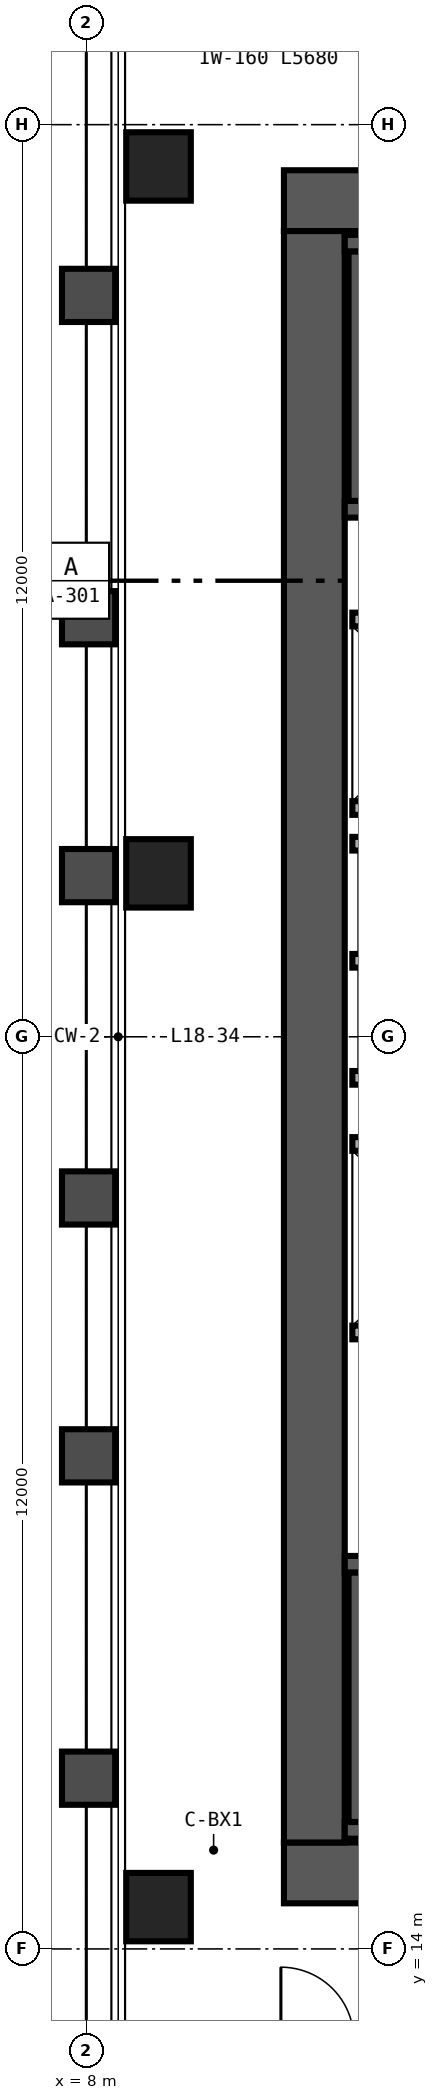
"""IFC4 building model, lengths in metres.
Left out: names, types, materials, properties, quantities, classifications, styles, units other than length and angle.
Written with IfcOpenShell. Run it as: python <this file> out.ifc"""

import sys

from ifc_helpers import new_model, si_unit, direction, frame, frame_2d, origin, origin_2d, place, context, subcontext, project, spatial, rectangle, hollow_rectangle, extrude, source, transform, mapped, element, save


model = new_model("IFC4")
c1 = context("Model", 3, precision=1e-05, world=origin(), true_north=direction((0.0, 1.0)))
c2 = subcontext(c1, "Body", "Model", "MODEL_VIEW")
j1 = project(units=[si_unit("LENGTHUNIT", "METRE"), si_unit("PLANEANGLEUNIT", "RADIAN")], contexts=[c1])
p1 = place(None, origin())
s1 = spatial("IfcSite", under=j1, at=p1, CompositionType="ELEMENT")
p2 = place(p1, origin())
s2 = spatial("IfcBuilding", under=s1, at=p2, CompositionType="ELEMENT")
p3 = place(p2, frame((0.0, 0.0, 74.4)))
s3 = spatial("IfcBuildingStorey", under=s2, at=p3, CompositionType="ELEMENT", Elevation=74.4)
p4 = place(p3, frame((10.6, 15.0, 0.0), z_axis=(0.0, 0.0, 1.0), x_axis=(1.0, 0.0, 0.0)))
e1 = element("IfcWall", 1, at=p4, inside=s3, PredefinedType="SHEAR", context=c2, shape_type="SweptSolid", body=[
    extrude(rectangle(XDim=12.8, YDim=0.8, at=frame_2d((6.4, 0.0))), origin(), (0.0, 0.0, 1.0), 3.35),
])
p5 = place(p4, frame((10.3, 0.0, 0.0)))
e2 = element("IfcOpeningElement", 2, at=p5, cuts=e1, PredefinedType="OPENING", context=c2, shape_type="SweptSolid", body=[
    extrude(rectangle(XDim=1.0, YDim=2.15, at=frame_2d((0.5, 1.075))), frame((0.0, 0.41, 0.0), z_axis=(0.0, -1.0, 0.0), x_axis=(1.0, 0.0, 0.0)), (0.0, 0.0, 1.0), 0.82),
])
p6 = place(p3, frame((10.6, 37.0, 0.0), z_axis=(0.0, 0.0, 1.0), x_axis=(1.0, 0.0, 0.0)))
e3 = element("IfcWall", 3, at=p6, inside=s3, PredefinedType="SHEAR", context=c2, shape_type="SweptSolid", body=[
    extrude(rectangle(XDim=12.8, YDim=0.8, at=frame_2d((6.4, 0.0))), origin(), (0.0, 0.0, 1.0), 3.35),
])
p7 = place(p6, frame((10.5, 0.0, 0.0)))
e4 = element("IfcOpeningElement", 4, at=p7, cuts=e3, PredefinedType="OPENING", context=c2, shape_type="SweptSolid", body=[
    extrude(rectangle(XDim=1.0, YDim=2.15, at=frame_2d((0.5, 1.075))), frame((0.0, 0.41, 0.0), z_axis=(0.0, -1.0, 0.0), x_axis=(1.0, 0.0, 0.0)), (0.0, 0.0, 1.0), 0.82),
])
p8 = place(p3, frame((11.0, 15.4, 0.0), z_axis=(0.0, 0.0, 1.0), x_axis=(0.0, 1.0, 0.0)))
e5 = element("IfcWall", 5, at=p8, inside=s3, PredefinedType="SHEAR", context=c2, shape_type="SweptSolid", body=[
    extrude(rectangle(XDim=21.2, YDim=0.8, at=frame_2d((10.6, 0.0))), origin(), (0.0, 0.0, 1.0), 3.35),
])
p9 = place(p3, frame((11.4, 15.56, 0.0), z_axis=(0.0, 0.0, 1.0), x_axis=(1.0, 0.0, 0.0)))
e6 = element("IfcWall", 6, at=p9, inside=s3, PredefinedType="SHEAR", context=c2, shape_type="SweptSolid", body=[
    extrude(rectangle(XDim=7.91, YDim=0.22, at=frame_2d((3.955, 0.0))), origin(), (0.0, 0.0, 1.0), 3.4),
])
p10 = place(p3, frame((11.4, 19.06, 0.0), z_axis=(0.0, 0.0, 1.0), x_axis=(1.0, 0.0, 0.0)))
e7 = element("IfcWall", 7, at=p10, inside=s3, PredefinedType="SHEAR", context=c2, shape_type="SweptSolid", body=[
    extrude(rectangle(XDim=7.91, YDim=0.22, at=frame_2d((3.955, 0.0))), origin(), (0.0, 0.0, 1.0), 3.4),
])
p11 = place(p10, frame((0.52, 0.0, 0.0)))
e8 = element("IfcOpeningElement", 8, at=p11, cuts=e7, PredefinedType="OPENING", context=c2, shape_type="SweptSolid", body=[
    extrude(rectangle(XDim=1.05, YDim=2.15, at=frame_2d((0.525, 1.075))), frame((0.0, 0.12, 0.0), z_axis=(0.0, -1.0, 0.0), x_axis=(1.0, 0.0, 0.0)), (0.0, 0.0, 1.0), 0.24),
])
p12 = place(p3, frame((11.56, 15.67, 0.0), z_axis=(0.0, 0.0, 1.0), x_axis=(0.0, 1.0, 0.0)))
e9 = element("IfcWall", 9, at=p12, inside=s3, PredefinedType="SHEAR", context=c2, shape_type="SweptSolid", body=[
    extrude(rectangle(XDim=3.28, YDim=0.22, at=frame_2d((1.64, 0.0))), origin(), (0.0, 0.0, 1.0), 3.4),
])
p13 = place(p3, frame((11.4, 32.94, 0.0), z_axis=(0.0, 0.0, 1.0), x_axis=(1.0, 0.0, 0.0)))
e10 = element("IfcWall", 10, at=p13, inside=s3, PredefinedType="SHEAR", context=c2, shape_type="SweptSolid", body=[
    extrude(rectangle(XDim=7.91, YDim=0.22, at=frame_2d((3.955, 0.0))), origin(), (0.0, 0.0, 1.0), 3.4),
])
p14 = place(p13, frame((0.52, 0.0, 0.0)))
e11 = element("IfcOpeningElement", 11, at=p14, cuts=e10, PredefinedType="OPENING", context=c2, shape_type="SweptSolid", body=[
    extrude(rectangle(XDim=1.05, YDim=2.15, at=frame_2d((0.525, 1.075))), frame((0.0, 0.12, 0.0), z_axis=(0.0, -1.0, 0.0), x_axis=(1.0, 0.0, 0.0)), (0.0, 0.0, 1.0), 0.24),
])
p15 = place(p3, frame((11.4, 36.44, 0.0), z_axis=(0.0, 0.0, 1.0), x_axis=(1.0, 0.0, 0.0)))
e12 = element("IfcWall", 12, at=p15, inside=s3, PredefinedType="SHEAR", context=c2, shape_type="SweptSolid", body=[
    extrude(rectangle(XDim=7.91, YDim=0.22, at=frame_2d((3.955, 0.0))), origin(), (0.0, 0.0, 1.0), 3.4),
])
p16 = place(p3, frame((11.56, 33.05, 0.0), z_axis=(0.0, 0.0, 1.0), x_axis=(0.0, 1.0, 0.0)))
e13 = element("IfcWall", 13, at=p16, inside=s3, PredefinedType="SHEAR", context=c2, shape_type="SweptSolid", body=[
    extrude(rectangle(XDim=3.28, YDim=0.22, at=frame_2d((1.64, 0.0))), origin(), (0.0, 0.0, 1.0), 3.4),
])
m1 = source(origin(), c2, "Body", "SweptSolid", [
    extrude(hollow_rectangle(XDim=0.85, YDim=0.9, WallThickness=0.04, at=origin_2d()), origin(), (0.0, 0.0, 1.0), 3.35),
])
for number, where, z_axis, x_axis in (
    (14, (8.95, 14.55, 0.0), (0.0, 0.0, 1.0), (1.0, 0.0, 0.0)),
    (15, (8.95, 28.15, 0.0), (0.0, 0.0, 1.0), (1.0, 0.0, 0.0)),
    (16, (8.95, 37.45, 0.0), (0.0, 0.0, 1.0), (1.0, 0.0, 0.0)),
):
    element("IfcColumn", number, at=place(p3, frame(where, z_axis=z_axis, x_axis=x_axis)), inside=s3, PredefinedType="COLUMN", context=c2, shape_type="MappedRepresentation", body=[
        mapped(m1, transform((0.0, 0.0, 0.0), scale=1.0)),
    ])
for number, where, z_axis, x_axis in (
    (17, (11.5, 22.11, 0.0), (0.0, 0.0, 1.0), (1.0, 0.0, 0.0)),
    (18, (11.5, 24.59, 0.0), (0.0, 0.0, 1.0), (1.0, 0.0, 0.0)),
    (19, (11.5, 29.01, 0.0), (0.0, 0.0, 1.0), (1.0, 0.0, 0.0)),
    (20, (11.5, 31.49, 0.0), (0.0, 0.0, 1.0), (1.0, 0.0, 0.0)),
):
    element("IfcWall", number, at=place(p3, frame(where, z_axis=z_axis, x_axis=x_axis)), inside=s3, PredefinedType="SOLIDWALL", context=c2, shape_type="SweptSolid", body=[
        extrude(rectangle(XDim=2.5, YDim=0.18, at=frame_2d((1.25, 0.0))), origin(), (0.0, 0.0, 1.0), 3.35),
    ])
for number, where, z_axis, x_axis in (
    (21, (11.5, 25.46, 0.0), (0.0, 0.0, 1.0), (1.0, 0.0, 0.0)),
    (22, (11.5, 27.0, 0.0), (0.0, 0.0, 1.0), (1.0, 0.0, 0.0)),
    (23, (11.5, 28.54, 0.0), (0.0, 0.0, 1.0), (1.0, 0.0, 0.0)),
):
    element("IfcWall", number, at=place(p3, frame(where, z_axis=z_axis, x_axis=x_axis)), inside=s3, PredefinedType="SOLIDWALL", context=c2, shape_type="SweptSolid", body=[
        extrude(rectangle(XDim=2.51, YDim=0.18, at=frame_2d((1.255, 0.0))), origin(), (0.0, 0.0, 1.0), 3.35),
    ])
save(model, sys.argv[1])
